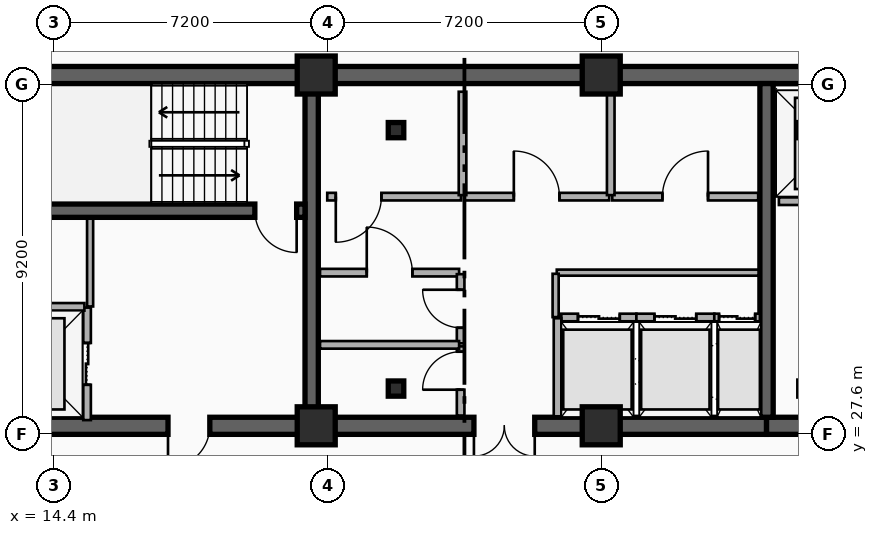
"""IFC4 building model, lengths in metres.
Left out: names, types, materials, properties, quantities, classifications, styles, units other than length and angle.
Written with IfcOpenShell. Run it as: python <this file> out.ifc"""

import sys

from ifc_helpers import new_model, si_unit, direction, frame, frame_2d, origin, origin_2d, place, context, subcontext, project, spatial, rectangle, i_section, extrude, element, fill, save


model = new_model("IFC4")
c1 = context("Model", 3, precision=1e-05, world=origin(), true_north=direction((0.0, 1.0)))
c2 = subcontext(c1, "Body", "Model", "MODEL_VIEW")
j1 = project(units=[si_unit("LENGTHUNIT", "METRE"), si_unit("PLANEANGLEUNIT", "RADIAN")], contexts=[c1])
p1 = place(None, origin())
s1 = spatial("IfcSite", under=j1, at=p1, CompositionType="ELEMENT")
p2 = place(p1, origin())
s2 = spatial("IfcBuilding", under=s1, at=p2, CompositionType="ELEMENT")
p3 = place(p2, frame((0.0, 0.0, 211.2)))
s3 = spatial("IfcBuildingStorey", under=s2, at=p3, CompositionType="ELEMENT", Elevation=211.2)
p4 = place(p3, frame((12.15, 37.05, 0.0), z_axis=(0.0, 0.0, 1.0), x_axis=(1.0, 0.0, 0.0)))
e1 = element("IfcWall", 1, at=p4, inside=s3, PredefinedType="SHEAR", context=c2, shape_type="SweptSolid", body=[
    extrude(rectangle(XDim=33.23, YDim=0.45, at=frame_2d((16.615, 0.0))), origin(), (0.0, 0.0, 1.0), 3.6),
])
p5 = place(p3, frame((21.18, 27.82, 0.0), z_axis=(0.0, 0.0, 1.0), x_axis=(-1.0, 0.0, 0.0)))
e2 = element("IfcWall", 2, at=p5, inside=s3, PredefinedType="SHEAR", context=c2, shape_type="SweptSolid", body=[
    extrude(rectangle(XDim=9.03, YDim=0.45, at=frame_2d((4.515, 0.0))), origin(), (0.0, 0.0, 1.0), 3.6),
])
p6 = place(p5, frame((2.68, 0.0, 0.0)))
e3 = element("IfcOpeningElement", 3, at=p6, cuts=e2, PredefinedType="OPENING", context=c2, shape_type="SweptSolid", body=[
    extrude(rectangle(XDim=1.1, YDim=2.15, at=frame_2d((0.55, 1.075))), frame((0.0, 0.235, 0.0), z_axis=(0.0, -1.0, 0.0), x_axis=(1.0, 0.0, 0.0)), (0.0, 0.0, 1.0), 0.47),
])
p7 = place(p3, frame((33.15, 27.82, 0.0), z_axis=(0.0, 0.0, 1.0), x_axis=(-1.0, 0.0, 0.0)))
e4 = element("IfcWall", 4, at=p7, inside=s3, PredefinedType="SHEAR", context=c2, shape_type="SweptSolid", body=[
    extrude(rectangle(XDim=11.97, YDim=0.45, at=frame_2d((5.985, 0.0))), origin(), (0.0, 0.0, 1.0), 3.6),
])
p8 = place(p7, frame((6.1, 0.0, 0.0)))
e5 = element("IfcOpeningElement", 5, at=p8, cuts=e4, PredefinedType="OPENING", context=c2, shape_type="SweptSolid", body=[
    extrude(rectangle(XDim=1.6, YDim=2.2, at=frame_2d((0.8, 1.1))), frame((0.0, 0.235, 0.0), z_axis=(0.0, -1.0, 0.0), x_axis=(1.0, 0.0, 0.0)), (0.0, 0.0, 1.0), 0.47),
])
p9 = place(p3, frame((45.38, 27.82, 0.0), z_axis=(0.0, 0.0, 1.0), x_axis=(-1.0, 0.0, 0.0)))
e6 = element("IfcWall", 6, at=p9, inside=s3, PredefinedType="SHEAR", context=c2, shape_type="SweptSolid", body=[
    extrude(rectangle(XDim=12.23, YDim=0.45, at=frame_2d((6.115, 0.0))), origin(), (0.0, 0.0, 1.0), 3.6),
])
p10 = place(p9, frame((9.93, 0.0, 0.0)))
e7 = element("IfcOpeningElement", 7, at=p10, cuts=e6, PredefinedType="OPENING", context=c2, shape_type="SweptSolid", body=[
    extrude(rectangle(XDim=1.1, YDim=2.15, at=frame_2d((0.55, 1.075))), frame((0.0, 0.235, 0.0), z_axis=(0.0, -1.0, 0.0), x_axis=(1.0, 0.0, 0.0)), (0.0, 0.0, 1.0), 0.47),
])
p11 = place(p9, frame((6.23, 0.0, 0.0)))
e8 = element("IfcOpeningElement", 8, at=p11, cuts=e6, PredefinedType="OPENING", context=c2, shape_type="SweptSolid", body=[
    extrude(rectangle(XDim=1.1, YDim=2.15, at=frame_2d((0.55, 1.075))), frame((0.0, 0.235, 0.0), z_axis=(0.0, -1.0, 0.0), x_axis=(1.0, 0.0, 0.0)), (0.0, 0.0, 1.0), 0.47),
])
for number, where, z_axis, x_axis in (
    (9, (21.18, 28.045, 0.0), (0.0, 0.0, 1.0), (0.0, 1.0, 0.0)),
    (10, (33.15, 28.045, 0.0), (0.0, 0.0, 1.0), (0.0, 1.0, 0.0)),
):
    element("IfcWall", number, at=place(p3, frame(where, z_axis=z_axis, x_axis=x_axis)), inside=s3, PredefinedType="SHEAR", context=c2, shape_type="SweptSolid", body=[
        extrude(rectangle(XDim=8.78, YDim=0.35, at=frame_2d((4.39, 0.0))), origin(), (0.0, 0.0, 1.0), 3.6),
    ])
p12 = place(p3, frame((21.005, 33.48, 0.0), z_axis=(0.0, 0.0, 1.0), x_axis=(-1.0, 0.0, 0.0)))
e11 = element("IfcWall", 11, at=p12, inside=s3, PredefinedType="SHEAR", context=c2, shape_type="SweptSolid", body=[
    extrude(rectangle(XDim=8.63, YDim=0.35, at=frame_2d((4.315, 0.0))), origin(), (0.0, 0.0, 1.0), 3.6),
])
p13 = place(p12, frame((0.22, 0.0, 0.0)))
e12 = element("IfcOpeningElement", 12, at=p13, cuts=e11, PredefinedType="OPENING", context=c2, shape_type="SweptSolid", body=[
    extrude(rectangle(XDim=1.1, YDim=2.15, at=frame_2d((0.55, 1.075))), frame((0.0, 0.185, 0.0), z_axis=(0.0, -1.0, 0.0), x_axis=(1.0, 0.0, 0.0)), (0.0, 0.0, 1.0), 0.37),
])
for number, where, z_axis, x_axis in (
    (13, (23.4, 28.8, 0.0), (0.0, 0.0, 1.0), (1.0, 0.0, 0.0)),
    (14, (23.4, 35.6, 0.0), (0.0, 0.0, 1.0), (1.0, 0.0, 0.0)),
):
    element("IfcColumn", number, at=place(p3, frame(where, z_axis=z_axis, x_axis=x_axis)), inside=s3, PredefinedType="COLUMN", context=c2, shape_type="SweptSolid", body=[
        extrude(i_section(OverallWidth=0.408, OverallDepth=0.4, WebThickness=0.025, FlangeThickness=0.039, FilletRadius=0.015, at=origin_2d()), origin(), (0.0, 0.0, 1.0), 3.6),
    ])
for number, where, z_axis, x_axis in (
    (15, (21.3, 27.82, 0.0), (0.0, 0.0, 1.0), (1.0, 0.0, 0.0)),
    (16, (21.3, 37.05, 0.0), (0.0, 0.0, 1.0), (1.0, 0.0, 0.0)),
    (17, (28.8, 27.82, 0.0), (0.0, 0.0, 1.0), (1.0, 0.0, 0.0)),
    (18, (28.8, 37.05, 0.0), (0.0, 0.0, 1.0), (1.0, 0.0, 0.0)),
):
    element("IfcColumn", number, at=place(p3, frame(where, z_axis=z_axis, x_axis=x_axis)), inside=s3, PredefinedType="COLUMN", context=c2, shape_type="SweptSolid", body=[
        extrude(rectangle(XDim=1.0, YDim=1.0, at=origin_2d()), origin(), (0.0, 0.0, 1.0), 3.6),
    ])
p14 = place(p3, frame((15.27, 27.97, 0.0), z_axis=(0.0, 0.0, 1.0), x_axis=(0.0, 1.0, 0.0)))
e19 = element("IfcWall", 19, at=p14, inside=s3, PredefinedType="PARTITIONING", context=c2, shape_type="SweptSolid", body=[
    extrude(rectangle(XDim=2.96, YDim=0.2, at=frame_2d((1.48, 0.0))), origin(), (0.0, 0.0, 1.0), 2.41),
])
p15 = place(p14, frame((0.93, 0.0, 0.0)))
e20 = element("IfcOpeningElement", 20, at=p15, cuts=e19, PredefinedType="OPENING", context=c2, shape_type="SweptSolid", body=[
    extrude(rectangle(XDim=1.1, YDim=2.15, at=frame_2d((0.55, 1.075))), frame((0.0, 0.11, 0.0), z_axis=(0.0, -1.0, 0.0), x_axis=(1.0, 0.0, 0.0)), (0.0, 0.0, 1.0), 0.22),
])
p16 = place(p3, frame((12.45, 30.95, 0.0), z_axis=(0.0, 0.0, 1.0), x_axis=(1.0, 0.0, 0.0)))
e21 = element("IfcWall", 21, at=p16, inside=s3, PredefinedType="PARTITIONING", context=c2, shape_type="SweptSolid", body=[
    extrude(rectangle(XDim=2.75, YDim=0.2, at=frame_2d((1.375, 0.0))), origin(), (0.0, 0.0, 1.0), 2.41),
])
p17 = place(p3, frame((33.475, 33.73, 0.0), z_axis=(0.0, 0.0, 1.0), x_axis=(1.0, 0.0, 0.0)))
e22 = element("IfcWall", 22, at=p17, inside=s3, PredefinedType="PARTITIONING", context=c2, shape_type="SweptSolid", body=[
    extrude(rectangle(XDim=2.725, YDim=0.2, at=frame_2d((1.362, 0.0))), origin(), (0.0, 0.0, 1.0), 2.41),
])
p18 = place(p17, frame((0.812, 0.0, 0.0)))
e23 = element("IfcOpeningElement", 23, at=p18, cuts=e22, PredefinedType="OPENING", context=c2, shape_type="SweptSolid", body=[
    extrude(rectangle(XDim=1.1, YDim=2.15, at=frame_2d((0.55, 1.075))), frame((0.0, 0.11, 0.0), z_axis=(0.0, -1.0, 0.0), x_axis=(1.0, 0.0, 0.0)), (0.0, 0.0, 1.0), 0.22),
])
p19 = place(p3, frame((27.75, 30.67, 0.0), z_axis=(0.0, 0.0, 1.0), x_axis=(1.0, 0.0, 0.0)))
e24 = element("IfcWall", 24, at=p19, inside=s3, PredefinedType="PARTITIONING", context=c2, shape_type="SweptSolid", body=[
    extrude(rectangle(XDim=1.975, YDim=0.2, at=frame_2d((0.988, 0.0))), origin(), (0.0, 0.0, 1.0), 2.41),
])
p20 = place(p19, frame((0.438, 0.0, 0.0)))
e25 = element("IfcOpeningElement", 25, at=p20, cuts=e24, PredefinedType="OPENING", context=c2, shape_type="SweptSolid", body=[
    extrude(rectangle(XDim=1.1, YDim=2.15, at=frame_2d((0.55, 1.075))), frame((0.0, 0.11, 0.0), z_axis=(0.0, -1.0, 0.0), x_axis=(1.0, 0.0, 0.0)), (0.0, 0.0, 1.0), 0.22),
])
p21 = place(p3, frame((27.65, 28.07, 0.0), z_axis=(0.0, 0.0, 1.0), x_axis=(0.0, 1.0, 0.0)))
e26 = element("IfcWall", 26, at=p21, inside=s3, PredefinedType="PARTITIONING", context=c2, shape_type="SweptSolid", body=[
    extrude(rectangle(XDim=2.58, YDim=0.2, at=frame_2d((1.29, 0.0))), origin(), (0.0, 0.0, 1.0), 2.41),
])
p22 = place(p3, frame((29.725, 30.67, 0.0), z_axis=(0.0, 0.0, 1.0), x_axis=(1.0, 0.0, 0.0)))
e27 = element("IfcWall", 27, at=p22, inside=s3, PredefinedType="PARTITIONING", context=c2, shape_type="SweptSolid", body=[
    extrude(rectangle(XDim=2.05, YDim=0.2, at=frame_2d((1.025, 0.0))), origin(), (0.0, 0.0, 1.0), 2.72),
])
p23 = place(p22, frame((0.475, 0.0, 0.0)))
e28 = element("IfcOpeningElement", 28, at=p23, cuts=e27, PredefinedType="OPENING", context=c2, shape_type="SweptSolid", body=[
    extrude(rectangle(XDim=1.1, YDim=2.15, at=frame_2d((0.55, 1.075))), frame((0.0, 0.11, 0.0), z_axis=(0.0, -1.0, 0.0), x_axis=(1.0, 0.0, 0.0)), (0.0, 0.0, 1.0), 0.22),
])
p24 = place(p3, frame((31.775, 30.67, 0.0), z_axis=(0.0, 0.0, 1.0), x_axis=(1.0, 0.0, 0.0)))
e29 = element("IfcWall", 29, at=p24, inside=s3, PredefinedType="PARTITIONING", context=c2, shape_type="SweptSolid", body=[
    extrude(rectangle(XDim=1.2, YDim=0.2, at=frame_2d((0.6, 0.0))), origin(), (0.0, 0.0, 1.0), 2.72),
])
p25 = place(p24, frame((0.125, 0.0, 0.0)))
e30 = element("IfcOpeningElement", 30, at=p25, cuts=e29, PredefinedType="OPENING", context=c2, shape_type="SweptSolid", body=[
    extrude(rectangle(XDim=0.95, YDim=2.15, at=frame_2d((0.475, 1.075))), frame((0.0, 0.11, 0.0), z_axis=(0.0, -1.0, 0.0), x_axis=(1.0, 0.0, 0.0)), (0.0, 0.0, 1.0), 0.22),
])
p26 = place(p3, frame((21.4, 31.85, 0.0), z_axis=(0.0, 0.0, 1.0), x_axis=(1.0, 0.0, 0.0)))
e31 = element("IfcWall", 31, at=p26, inside=s3, PredefinedType="PARTITIONING", context=c2, shape_type="SweptSolid", body=[
    extrude(rectangle(XDim=3.66, YDim=0.2, at=frame_2d((1.83, 0.0))), origin(), (0.0, 0.0, 1.0), 2.41),
])
p27 = place(p26, frame((1.23, 0.0, 0.0)))
e32 = element("IfcOpeningElement", 32, at=p27, cuts=e31, PredefinedType="OPENING", context=c2, shape_type="SweptSolid", body=[
    extrude(rectangle(XDim=1.2, YDim=2.15, at=frame_2d((0.6, 1.075))), frame((0.0, 0.11, 0.0), z_axis=(0.0, -1.0, 0.0), x_axis=(1.0, 0.0, 0.0)), (0.0, 0.0, 1.0), 0.22),
])
p28 = place(p3, frame((25.11, 33.85, 0.0), z_axis=(0.0, 0.0, 1.0), x_axis=(-1.0, 0.0, 0.0)))
e33 = element("IfcWall", 33, at=p28, inside=s3, PredefinedType="PARTITIONING", context=c2, shape_type="SweptSolid", body=[
    extrude(rectangle(XDim=3.52, YDim=0.2, at=frame_2d((1.76, 0.0))), origin(), (0.0, 0.0, 1.0), 2.41),
])
p29 = place(p28, frame((2.095, 0.0, 0.0)))
e34 = element("IfcOpeningElement", 34, at=p29, cuts=e33, PredefinedType="OPENING", context=c2, shape_type="SweptSolid", body=[
    extrude(rectangle(XDim=1.2, YDim=2.15, at=frame_2d((0.6, 1.075))), frame((0.0, 0.11, 0.0), z_axis=(0.0, -1.0, 0.0), x_axis=(1.0, 0.0, 0.0)), (0.0, 0.0, 1.0), 0.22),
])
p30 = place(p3, frame((25.19, 33.85, 0.0), z_axis=(0.0, 0.0, 1.0), x_axis=(1.0, 0.0, 0.0)))
e35 = element("IfcWall", 35, at=p30, inside=s3, PredefinedType="PARTITIONING", context=c2, shape_type="SweptSolid", body=[
    extrude(rectangle(XDim=3.82, YDim=0.2, at=frame_2d((1.91, 0.0))), origin(), (0.0, 0.0, 1.0), 2.41),
])
p31 = place(p30, frame((1.31, 0.0, 0.0)))
e36 = element("IfcOpeningElement", 36, at=p31, cuts=e35, PredefinedType="OPENING", context=c2, shape_type="SweptSolid", body=[
    extrude(rectangle(XDim=1.2, YDim=2.15, at=frame_2d((0.6, 1.075))), frame((0.0, 0.11, 0.0), z_axis=(0.0, -1.0, 0.0), x_axis=(1.0, 0.0, 0.0)), (0.0, 0.0, 1.0), 0.22),
])
p32 = place(p3, frame((29.09, 33.85, 0.0), z_axis=(0.0, 0.0, 1.0), x_axis=(1.0, 0.0, 0.0)))
e37 = element("IfcWall", 37, at=p32, inside=s3, PredefinedType="PARTITIONING", context=c2, shape_type="SweptSolid", body=[
    extrude(rectangle(XDim=3.84, YDim=0.2, at=frame_2d((1.92, 0.0))), origin(), (0.0, 0.0, 1.0), 2.41),
])
p33 = place(p32, frame((1.32, 0.0, 0.0)))
e38 = element("IfcOpeningElement", 38, at=p33, cuts=e37, PredefinedType="OPENING", context=c2, shape_type="SweptSolid", body=[
    extrude(rectangle(XDim=1.2, YDim=2.15, at=frame_2d((0.6, 1.075))), frame((0.0, 0.11, 0.0), z_axis=(0.0, -1.0, 0.0), x_axis=(1.0, 0.0, 0.0)), (0.0, 0.0, 1.0), 0.22),
])
p34 = place(p3, frame((25.1, 28.09, 0.0), z_axis=(0.0, 0.0, 1.0), x_axis=(0.0, 1.0, 0.0)))
e39 = element("IfcWall", 39, at=p34, inside=s3, PredefinedType="PARTITIONING", context=c2, shape_type="SweptSolid", body=[
    extrude(rectangle(XDim=1.82, YDim=0.2, at=frame_2d((0.91, 0.0))), origin(), (0.0, 0.0, 1.0), 2.72),
])
p35 = place(p34, frame((0.68, 0.0, 0.0)))
e40 = element("IfcOpeningElement", 40, at=p35, cuts=e39, PredefinedType="OPENING", context=c2, shape_type="SweptSolid", body=[
    extrude(rectangle(XDim=1.0, YDim=2.15, at=frame_2d((0.5, 1.075))), frame((0.0, 0.11, 0.0), z_axis=(0.0, -1.0, 0.0), x_axis=(1.0, 0.0, 0.0)), (0.0, 0.0, 1.0), 0.22),
])
p36 = place(p3, frame((25.1, 29.99, 0.0), z_axis=(0.0, 0.0, 1.0), x_axis=(0.0, 1.0, 0.0)))
e41 = element("IfcWall", 41, at=p36, inside=s3, PredefinedType="PARTITIONING", context=c2, shape_type="SweptSolid", body=[
    extrude(rectangle(XDim=1.82, YDim=0.2, at=frame_2d((0.91, 0.0))), origin(), (0.0, 0.0, 1.0), 3.34),
])
p37 = place(p36, frame((0.41, 0.0, 0.0)))
e42 = element("IfcOpeningElement", 42, at=p37, cuts=e41, PredefinedType="OPENING", context=c2, shape_type="SweptSolid", body=[
    extrude(rectangle(XDim=1.0, YDim=2.15, at=frame_2d((0.5, 1.075))), frame((0.0, 0.11, 0.0), z_axis=(0.0, -1.0, 0.0), x_axis=(1.0, 0.0, 0.0)), (0.0, 0.0, 1.0), 0.22),
])
p38 = place(p3, frame((21.4, 29.95, 0.0), z_axis=(0.0, 0.0, 1.0), x_axis=(1.0, 0.0, 0.0)))
e43 = element("IfcWall", 43, at=p38, inside=s3, PredefinedType="PARTITIONING", context=c2, shape_type="SweptSolid", body=[
    extrude(rectangle(XDim=3.66, YDim=0.2, at=frame_2d((1.83, 0.0))), origin(), (0.0, 0.0, 1.0), 2.41),
])
p39 = place(p3, frame((25.15, 33.89, 0.0), z_axis=(0.0, 0.0, 1.0), x_axis=(0.0, 1.0, 0.0)))
e44 = element("IfcWall", 44, at=p39, inside=s3, PredefinedType="PARTITIONING", context=c2, shape_type="SweptSolid", body=[
    extrude(rectangle(XDim=2.72, YDim=0.2, at=frame_2d((1.36, 0.0))), origin(), (0.0, 0.0, 1.0), 3.34),
])
p40 = place(p3, frame((29.05, 33.89, 0.0), z_axis=(0.0, 0.0, 1.0), x_axis=(0.0, 1.0, 0.0)))
e45 = element("IfcWall", 45, at=p40, inside=s3, PredefinedType="PARTITIONING", context=c2, shape_type="SweptSolid", body=[
    extrude(rectangle(XDim=2.72, YDim=0.2, at=frame_2d((1.36, 0.0))), origin(), (0.0, 0.0, 1.0), 2.41),
])
p41 = place(p3, frame((15.35, 30.96, 0.0), z_axis=(0.0, 0.0, 1.0), x_axis=(0.0, 1.0, 0.0)))
e46 = element("IfcWall", 46, at=p41, inside=s3, PredefinedType="PARTITIONING", context=c2, shape_type="SweptSolid", body=[
    extrude(rectangle(XDim=2.31, YDim=0.16, at=frame_2d((1.155, 0.0))), origin(), (0.0, 0.0, 1.0), 3.34),
])
p42 = place(p3, frame((27.63, 31.85, 0.0), z_axis=(0.0, 0.0, 1.0), x_axis=(1.0, 0.0, 0.0)))
e47 = element("IfcWall", 47, at=p42, inside=s3, PredefinedType="PARTITIONING", context=c2, shape_type="SweptSolid", body=[
    extrude(rectangle(XDim=5.31, YDim=0.16, at=frame_2d((2.655, 0.0))), origin(), (0.0, 0.0, 1.0), 2.41),
])
p43 = place(p3, frame((27.6, 30.68, 0.0), z_axis=(0.0, 0.0, 1.0), x_axis=(0.0, 1.0, 0.0)))
e48 = element("IfcWall", 48, at=p43, inside=s3, PredefinedType="PARTITIONING", context=c2, shape_type="SweptSolid", body=[
    extrude(rectangle(XDim=1.14, YDim=0.16, at=frame_2d((0.57, 0.0))), origin(), (0.0, 0.0, 1.0), 3.34),
])
p44 = place(p15, origin())
e49 = element("IfcDoor", 49, at=p44, inside=s3, OperationType="DOUBLE_DOOR_SLIDING", PredefinedType="DOOR", context=c2, shape_type="SweptSolid", body=[
    extrude(rectangle(XDim=1.1, YDim=2.15, at=frame_2d((0.55, 1.075))), frame((0.0, 0.025, 0.0), z_axis=(0.0, -1.0, 0.0), x_axis=(1.0, 0.0, 0.0)), (0.0, 0.0, 1.0), 0.05),
])
fill(e20, e49)
p45 = place(p20, origin())
e50 = element("IfcDoor", 50, at=p45, inside=s3, OperationType="DOUBLE_DOOR_SLIDING", PredefinedType="DOOR", context=c2, shape_type="SweptSolid", body=[
    extrude(rectangle(XDim=1.1, YDim=2.15, at=frame_2d((0.55, 1.075))), frame((0.0, 0.025, 0.0), z_axis=(0.0, -1.0, 0.0), x_axis=(1.0, 0.0, 0.0)), (0.0, 0.0, 1.0), 0.05),
])
fill(e25, e50)
p46 = place(p23, origin())
e51 = element("IfcDoor", 51, at=p46, inside=s3, OperationType="DOUBLE_DOOR_SLIDING", PredefinedType="DOOR", context=c2, shape_type="SweptSolid", body=[
    extrude(rectangle(XDim=1.1, YDim=2.15, at=frame_2d((0.55, 1.075))), frame((0.0, 0.025, 0.0), z_axis=(0.0, -1.0, 0.0), x_axis=(1.0, 0.0, 0.0)), (0.0, 0.0, 1.0), 0.05),
])
fill(e28, e51)
p47 = place(p25, origin())
e52 = element("IfcDoor", 52, at=p47, inside=s3, OperationType="DOUBLE_DOOR_SLIDING", PredefinedType="DOOR", context=c2, shape_type="SweptSolid", body=[
    extrude(rectangle(XDim=0.95, YDim=2.15, at=frame_2d((0.475, 1.075))), frame((0.0, 0.025, 0.0), z_axis=(0.0, -1.0, 0.0), x_axis=(1.0, 0.0, 0.0)), (0.0, 0.0, 1.0), 0.05),
])
fill(e30, e52)
p48 = place(p13, origin())
e53 = element("IfcDoor", 53, at=p48, inside=s3, OperationType="SINGLE_SWING_LEFT", PredefinedType="DOOR", context=c2, shape_type="SweptSolid", body=[
    extrude(rectangle(XDim=1.1, YDim=2.15, at=frame_2d((0.55, 1.075))), frame((0.0, 0.025, 0.0), z_axis=(0.0, -1.0, 0.0), x_axis=(1.0, 0.0, 0.0)), (0.0, 0.0, 1.0), 0.05),
])
fill(e12, e53)
p49 = place(p6, origin())
e54 = element("IfcDoor", 54, at=p49, inside=s3, OperationType="SINGLE_SWING_RIGHT", PredefinedType="DOOR", context=c2, shape_type="SweptSolid", body=[
    extrude(rectangle(XDim=1.1, YDim=2.15, at=frame_2d((0.55, 1.075))), frame((0.0, 0.025, 0.0), z_axis=(0.0, -1.0, 0.0), x_axis=(1.0, 0.0, 0.0)), (0.0, 0.0, 1.0), 0.05),
])
fill(e3, e54)
p50 = place(p8, origin())
e55 = element("IfcDoor", 55, at=p50, inside=s3, OperationType="SINGLE_SWING_LEFT", PredefinedType="DOOR", context=c2, shape_type="SweptSolid", body=[
    extrude(rectangle(XDim=1.6, YDim=2.2, at=frame_2d((0.8, 1.1))), frame((0.0, 0.025, 0.0), z_axis=(0.0, -1.0, 0.0), x_axis=(1.0, 0.0, 0.0)), (0.0, 0.0, 1.0), 0.05),
])
fill(e5, e55)
p51 = place(p27, origin())
e56 = element("IfcDoor", 56, at=p51, inside=s3, OperationType="SINGLE_SWING_LEFT", PredefinedType="DOOR", context=c2, shape_type="SweptSolid", body=[
    extrude(rectangle(XDim=1.2, YDim=2.15, at=frame_2d((0.6, 1.075))), frame((0.0, 0.025, 0.0), z_axis=(0.0, -1.0, 0.0), x_axis=(1.0, 0.0, 0.0)), (0.0, 0.0, 1.0), 0.05),
])
fill(e32, e56)
p52 = place(p29, origin())
e57 = element("IfcDoor", 57, at=p52, inside=s3, OperationType="SINGLE_SWING_RIGHT", PredefinedType="DOOR", context=c2, shape_type="SweptSolid", body=[
    extrude(rectangle(XDim=1.2, YDim=2.15, at=frame_2d((0.6, 1.075))), frame((0.0, 0.025, 0.0), z_axis=(0.0, -1.0, 0.0), x_axis=(1.0, 0.0, 0.0)), (0.0, 0.0, 1.0), 0.05),
])
fill(e34, e57)
p53 = place(p31, origin())
e58 = element("IfcDoor", 58, at=p53, inside=s3, OperationType="SINGLE_SWING_LEFT", PredefinedType="DOOR", context=c2, shape_type="SweptSolid", body=[
    extrude(rectangle(XDim=1.2, YDim=2.15, at=frame_2d((0.6, 1.075))), frame((0.0, 0.025, 0.0), z_axis=(0.0, -1.0, 0.0), x_axis=(1.0, 0.0, 0.0)), (0.0, 0.0, 1.0), 0.05),
])
fill(e36, e58)
p54 = place(p33, origin())
e59 = element("IfcDoor", 59, at=p54, inside=s3, OperationType="SINGLE_SWING_RIGHT", PredefinedType="DOOR", context=c2, shape_type="SweptSolid", body=[
    extrude(rectangle(XDim=1.2, YDim=2.15, at=frame_2d((0.6, 1.075))), frame((0.0, 0.025, 0.0), z_axis=(0.0, -1.0, 0.0), x_axis=(1.0, 0.0, 0.0)), (0.0, 0.0, 1.0), 0.05),
])
fill(e38, e59)
p55 = place(p35, origin())
e60 = element("IfcDoor", 60, at=p55, inside=s3, OperationType="SINGLE_SWING_LEFT", PredefinedType="DOOR", context=c2, shape_type="SweptSolid", body=[
    extrude(rectangle(XDim=1.0, YDim=2.15, at=frame_2d((0.5, 1.075))), frame((0.0, 0.025, 0.0), z_axis=(0.0, -1.0, 0.0), x_axis=(1.0, 0.0, 0.0)), (0.0, 0.0, 1.0), 0.05),
])
fill(e40, e60)
p56 = place(p37, origin())
e61 = element("IfcDoor", 61, at=p56, inside=s3, OperationType="SINGLE_SWING_RIGHT", PredefinedType="DOOR", context=c2, shape_type="SweptSolid", body=[
    extrude(rectangle(XDim=1.0, YDim=2.15, at=frame_2d((0.5, 1.075))), frame((0.0, 0.025, 0.0), z_axis=(0.0, -1.0, 0.0), x_axis=(1.0, 0.0, 0.0)), (0.0, 0.0, 1.0), 0.05),
])
fill(e42, e61)
save(model, sys.argv[1])
